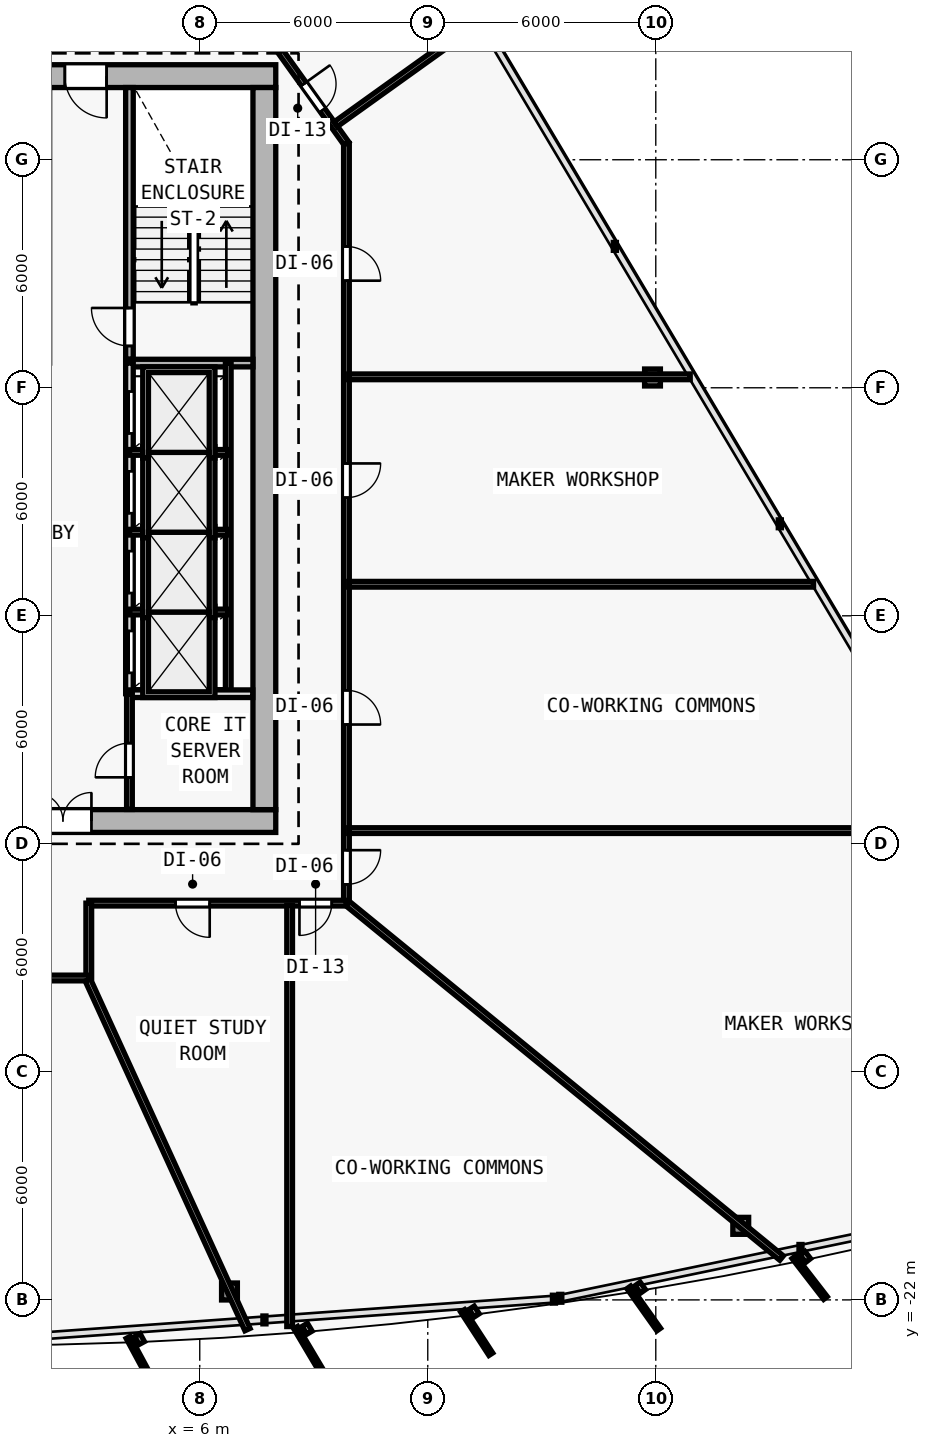
"""IFC4 building model, lengths in metres.
Left out: names, types, materials, properties, quantities, classifications, styles, units other than length and angle.
Written with IfcOpenShell. Run it as: python <this file> out.ifc"""

import sys

from ifc_helpers import new_model, si_unit, direction, frame, frame_2d, origin, origin_2d, place, context, subcontext, project, spatial, rectangle, i_section, extrude, element, fill, save


model = new_model("IFC4")
c1 = context("Model", 3, precision=1e-05, world=origin(), true_north=direction((0.0, 1.0)))
c2 = subcontext(c1, "Body", "Model", "MODEL_VIEW")
j1 = project(units=[si_unit("LENGTHUNIT", "METRE"), si_unit("PLANEANGLEUNIT", "RADIAN")], contexts=[c1])
p1 = place(None, origin())
s1 = spatial("IfcSite", under=j1, at=p1, CompositionType="ELEMENT")
p2 = place(p1, origin())
s2 = spatial("IfcBuilding", under=s1, at=p2, CompositionType="ELEMENT")
p3 = place(p2, frame((0.0, 0.0, 33.6)))
s3 = spatial("IfcBuildingStorey", under=s2, at=p3, CompositionType="ELEMENT", Elevation=33.6)
for number, where, z_axis, x_axis in (
    (1, (7.7, -9.4, 0.0), (0.0, 0.0, 1.0), (1.0, 0.0, 0.0)),
    (2, (7.7, 10.2, 0.0), (0.0, 0.0, 1.0), (1.0, 0.0, 0.0)),
    (3, (7.7, 0.4, 0.0), (0.0, 0.0, 1.0), (1.0, 0.0, 0.0)),
):
    element("IfcColumn", number, at=place(p3, frame(where, z_axis=z_axis, x_axis=x_axis)), inside=s3, PredefinedType="COLUMN", context=c2, shape_type="SweptSolid", body=[
        extrude(i_section(OverallWidth=0.416, OverallDepth=0.446, WebThickness=0.025, FlangeThickness=0.04, FilletRadius=0.015, at=origin_2d()), origin(), (0.0, 0.0, 1.0), 3.6),
    ])
p4 = place(p3, frame((6.782, -21.779, 0.005), z_axis=(-0.006865841702, 0.035280909339, 0.999353850072), x_axis=(-0.981585848295, -0.191021523464, 0.0)))
e4 = element("IfcColumn", 4, at=p4, inside=s3, PredefinedType="COLUMN", context=c2, shape_type="SweptSolid", body=[
    extrude(i_section(OverallWidth=0.416, OverallDepth=0.446, WebThickness=0.025, FlangeThickness=0.04, FilletRadius=0.015, at=origin_2d()), origin(), (0.0, 0.0, 1.0), 3.592),
])
p5 = place(p3, frame((20.236, -20.051, 0.005), z_axis=(-0.020594893987, 0.033509183946, 0.999226193078), x_axis=(-0.851954850327, -0.523615252838, 0.0)))
e5 = element("IfcColumn", 5, at=p5, inside=s3, PredefinedType="COLUMN", context=c2, shape_type="SweptSolid", body=[
    extrude(i_section(OverallWidth=0.416, OverallDepth=0.446, WebThickness=0.025, FlangeThickness=0.04, FilletRadius=0.015, at=origin_2d()), origin(), (0.0, 0.0, 1.0), 3.592),
])
p6 = place(p3, frame((17.914, 2.271, 0.005), z_axis=(-0.018906041, 0.009521027842, 0.999775930718), x_axis=(-0.449781931574, -0.893138406984, 0.0)))
e6 = element("IfcColumn", 6, at=p6, inside=s3, PredefinedType="COLUMN", context=c2, shape_type="SweptSolid", body=[
    extrude(i_section(OverallWidth=0.416, OverallDepth=0.446, WebThickness=0.025, FlangeThickness=0.04, FilletRadius=0.015, at=origin_2d()), origin(), (0.0, 0.0, 1.0), 3.59),
])
p7 = place(p3, frame((-8.0, -9.4, 0.0), z_axis=(0.0, 0.0, 1.0), x_axis=(1.0, 0.0, 0.0)))
e7 = element("IfcWall", 7, at=p7, inside=s3, PredefinedType="SHEAR", context=c2, shape_type="SweptSolid", body=[
    extrude(rectangle(XDim=16.0, YDim=0.6, at=frame_2d((8.0, 0.0))), origin(), (0.0, 0.0, 1.0), 3.35),
])
p8 = place(p7, frame((9.65, 0.0, 0.0)))
e8 = element("IfcOpeningElement", 8, at=p8, cuts=e7, PredefinedType="OPENING", context=c2, shape_type="SweptSolid", body=[
    extrude(rectangle(XDim=1.5, YDim=2.2, at=frame_2d((0.75, 1.1))), frame((0.0, 0.31, 0.0), z_axis=(0.0, -1.0, 0.0), x_axis=(1.0, 0.0, 0.0)), (0.0, 0.0, 1.0), 0.62),
])
p9 = place(p3, frame((8.0, 10.2, 0.0), z_axis=(0.0, 0.0, 1.0), x_axis=(-1.0, 0.0, 0.0)))
e9 = element("IfcWall", 9, at=p9, inside=s3, PredefinedType="SHEAR", context=c2, shape_type="SweptSolid", body=[
    extrude(rectangle(XDim=16.0, YDim=0.6, at=frame_2d((8.0, 0.0))), origin(), (0.0, 0.0, 1.0), 3.35),
])
p10 = place(p9, frame((4.45, 0.0, 0.0)))
e10 = element("IfcOpeningElement", 10, at=p10, cuts=e9, PredefinedType="OPENING", context=c2, shape_type="SweptSolid", body=[
    extrude(rectangle(XDim=1.1, YDim=2.15, at=frame_2d((0.55, 1.075))), frame((0.0, 0.31, 0.0), z_axis=(0.0, -1.0, 0.0), x_axis=(1.0, 0.0, 0.0)), (0.0, 0.0, 1.0), 0.62),
])
p11 = place(p3, frame((7.7, 9.9, 0.0), z_axis=(0.0, 0.0, 1.0), x_axis=(0.0, -1.0, 0.0)))
e11 = element("IfcWall", 11, at=p11, inside=s3, PredefinedType="SHEAR", context=c2, shape_type="SweptSolid", body=[
    extrude(rectangle(XDim=19.0, YDim=0.6, at=frame_2d((9.5, 0.0))), origin(), (0.0, 0.0, 1.0), 3.35),
])
p12 = place(p3, frame((4.15, 2.75, 0.0), z_axis=(0.0, 0.0, 1.0), x_axis=(0.0, 1.0, 0.0)))
e12 = element("IfcWall", 12, at=p12, inside=s3, PredefinedType="SOLIDWALL", context=c2, shape_type="SweptSolid", body=[
    extrude(rectangle(XDim=7.15, YDim=0.2, at=frame_2d((3.575, 0.0))), origin(), (0.0, 0.0, 1.0), 3.35),
])
p13 = place(p12, frame((0.35, 0.0, 0.0)))
e13 = element("IfcOpeningElement", 13, at=p13, cuts=e12, PredefinedType="OPENING", context=c2, shape_type="SweptSolid", body=[
    extrude(rectangle(XDim=1.0, YDim=2.15, at=frame_2d((0.5, 1.075))), frame((0.0, 0.11, 0.0), z_axis=(0.0, -1.0, 0.0), x_axis=(1.0, 0.0, 0.0)), (0.0, 0.0, 1.0), 0.22),
])
p14 = place(p3, frame((4.05, 2.65, 0.0), z_axis=(0.0, 0.0, 1.0), x_axis=(1.0, 0.0, 0.0)))
e14 = element("IfcWall", 14, at=p14, inside=s3, PredefinedType="SOLIDWALL", context=c2, shape_type="SweptSolid", body=[
    extrude(rectangle(XDim=3.35, YDim=0.2, at=frame_2d((1.675, 0.0))), origin(), (0.0, 0.0, 1.0), 3.35),
])
p15 = place(p3, frame((4.15, -6.05, 0.0), z_axis=(0.0, 0.0, 1.0), x_axis=(0.0, 1.0, 0.0)))
e15 = element("IfcWall", 15, at=p15, inside=s3, PredefinedType="SOLIDWALL", context=c2, shape_type="SweptSolid", body=[
    extrude(rectangle(XDim=8.7, YDim=0.2, at=frame_2d((4.35, 0.0))), origin(), (0.0, 0.0, 1.0), 3.35),
])
p16 = place(p15, frame((0.55, 0.0, 0.0)))
e16 = element("IfcOpeningElement", 16, at=p16, cuts=e15, PredefinedType="OPENING", context=c2, shape_type="SweptSolid", body=[
    extrude(rectangle(XDim=1.1, YDim=2.15, at=frame_2d((0.55, 1.075))), frame((0.0, 0.11, 0.0), z_axis=(0.0, -1.0, 0.0), x_axis=(1.0, 0.0, 0.0)), (0.0, 0.0, 1.0), 0.22),
])
p17 = place(p15, frame((2.65, 0.0, 0.0)))
e17 = element("IfcOpeningElement", 17, at=p17, cuts=e15, PredefinedType="OPENING", context=c2, shape_type="SweptSolid", body=[
    extrude(rectangle(XDim=1.1, YDim=2.15, at=frame_2d((0.55, 1.075))), frame((0.0, 0.11, 0.0), z_axis=(0.0, -1.0, 0.0), x_axis=(1.0, 0.0, 0.0)), (0.0, 0.0, 1.0), 0.22),
])
p18 = place(p15, frame((4.75, 0.0, 0.0)))
e18 = element("IfcOpeningElement", 18, at=p18, cuts=e15, PredefinedType="OPENING", context=c2, shape_type="SweptSolid", body=[
    extrude(rectangle(XDim=1.1, YDim=2.15, at=frame_2d((0.55, 1.075))), frame((0.0, 0.11, 0.0), z_axis=(0.0, -1.0, 0.0), x_axis=(1.0, 0.0, 0.0)), (0.0, 0.0, 1.0), 0.22),
])
p19 = place(p15, frame((6.85, 0.0, 0.0)))
e19 = element("IfcOpeningElement", 19, at=p19, cuts=e15, PredefinedType="OPENING", context=c2, shape_type="SweptSolid", body=[
    extrude(rectangle(XDim=1.1, YDim=2.15, at=frame_2d((0.55, 1.075))), frame((0.0, 0.11, 0.0), z_axis=(0.0, -1.0, 0.0), x_axis=(1.0, 0.0, 0.0)), (0.0, 0.0, 1.0), 0.22),
])
p20 = place(p3, frame((6.75, -6.05, 0.0), z_axis=(0.0, 0.0, 1.0), x_axis=(0.0, 1.0, 0.0)))
e20 = element("IfcWall", 20, at=p20, inside=s3, PredefinedType="PARTITIONING", context=c2, shape_type="SweptSolid", body=[
    extrude(rectangle(XDim=8.7, YDim=0.15, at=frame_2d((4.35, 0.0))), origin(), (0.0, 0.0, 1.0), 3.35),
])
for number, where, z_axis, x_axis in (
    (21, (4.15, -3.9, 0.0), (0.0, 0.0, 1.0), (1.0, 0.0, 0.0)),
    (22, (4.15, -1.8, 0.0), (0.0, 0.0, 1.0), (1.0, 0.0, 0.0)),
    (23, (4.15, 0.3, 0.0), (0.0, 0.0, 1.0), (1.0, 0.0, 0.0)),
):
    element("IfcWall", number, at=place(p3, frame(where, z_axis=z_axis, x_axis=x_axis)), inside=s3, PredefinedType="PARTITIONING", context=c2, shape_type="SweptSolid", body=[
        extrude(rectangle(XDim=2.6, YDim=0.15, at=frame_2d((1.3, 0.0))), origin(), (0.0, 0.0, 1.0), 3.35),
    ])
p21 = place(p3, frame((4.15, -6.05, 0.0), z_axis=(0.0, 0.0, 1.0), x_axis=(1.0, 0.0, 0.0)))
e24 = element("IfcWall", 24, at=p21, inside=s3, PredefinedType="SOLIDWALL", context=c2, shape_type="SweptSolid", body=[
    extrude(rectangle(XDim=3.245, YDim=0.2, at=frame_2d((1.623, 0.0))), origin(), (0.0, 0.0, 1.0), 3.35),
])
p22 = place(p3, frame((4.15, -9.095, 0.0), z_axis=(0.0, 0.0, 1.0), x_axis=(0.0, 1.0, 0.0)))
e25 = element("IfcWall", 25, at=p22, inside=s3, PredefinedType="PARTITIONING", context=c2, shape_type="SweptSolid", body=[
    extrude(rectangle(XDim=3.045, YDim=0.15, at=frame_2d((1.522, 0.0))), origin(), (0.0, 0.0, 1.0), 3.35),
])
p23 = place(p22, frame((0.845, 0.0, 0.0)))
e26 = element("IfcOpeningElement", 26, at=p23, cuts=e25, PredefinedType="OPENING", context=c2, shape_type="SweptSolid", body=[
    extrude(rectangle(XDim=0.9, YDim=2.1, at=frame_2d((0.45, 1.05))), frame((0.0, 0.085, 0.0), z_axis=(0.0, -1.0, 0.0), x_axis=(1.0, 0.0, 0.0)), (0.0, 0.0, 1.0), 0.17),
])
p24 = place(p3, frame((7.041, 12.36, 0.0), z_axis=(0.0, 0.0, 1.0), x_axis=(0.582449511476, -0.812866881218, 0.0)))
e27 = element("IfcWall", 27, at=p24, inside=s3, PredefinedType="PARTITIONING", context=c2, shape_type="SweptSolid", body=[
    extrude(rectangle(XDim=4.84, YDim=0.15, at=frame_2d((2.42, 0.0))), origin(), (0.0, 0.0, 1.0), 2.725),
])
p25 = place(p24, frame((2.911, 0.0, 0.0)))
e28 = element("IfcOpeningElement", 28, at=p25, cuts=e27, PredefinedType="OPENING", context=c2, shape_type="SweptSolid", body=[
    extrude(rectangle(XDim=0.85, YDim=2.1, at=frame_2d((0.425, 1.05))), frame((0.0, 0.085, 0.0), z_axis=(0.0, -1.0, 0.0), x_axis=(1.0, 0.0, 0.0)), (0.0, 0.0, 1.0), 0.17),
])
p26 = place(p3, frame((9.86, 8.426, 0.0), z_axis=(0.0, 0.0, 1.0), x_axis=(0.0, -1.0, 0.0)))
e29 = element("IfcWall", 29, at=p26, inside=s3, PredefinedType="PARTITIONING", context=c2, shape_type="SweptSolid", body=[
    extrude(rectangle(XDim=19.986, YDim=0.15, at=frame_2d((9.993, 0.0))), origin(), (0.0, 0.0, 1.0), 2.609),
])
p27 = place(p26, frame((18.592, 0.0, 0.0)))
e30 = element("IfcOpeningElement", 30, at=p27, cuts=e29, PredefinedType="OPENING", context=c2, shape_type="SweptSolid", body=[
    extrude(rectangle(XDim=0.9, YDim=2.1, at=frame_2d((0.45, 1.05))), frame((0.0, 0.085, 0.0), z_axis=(0.0, -1.0, 0.0), x_axis=(1.0, 0.0, 0.0)), (0.0, 0.0, 1.0), 0.17),
])
p28 = place(p26, frame((14.386, 0.0, 0.0)))
e31 = element("IfcOpeningElement", 31, at=p28, cuts=e29, PredefinedType="OPENING", context=c2, shape_type="SweptSolid", body=[
    extrude(rectangle(XDim=0.9, YDim=2.1, at=frame_2d((0.45, 1.05))), frame((0.0, 0.085, 0.0), z_axis=(0.0, -1.0, 0.0), x_axis=(1.0, 0.0, 0.0)), (0.0, 0.0, 1.0), 0.17),
])
p29 = place(p26, frame((8.417, 0.0, 0.0)))
e32 = element("IfcOpeningElement", 32, at=p29, cuts=e29, PredefinedType="OPENING", context=c2, shape_type="SweptSolid", body=[
    extrude(rectangle(XDim=0.9, YDim=2.1, at=frame_2d((0.45, 1.05))), frame((0.0, 0.085, 0.0), z_axis=(0.0, -1.0, 0.0), x_axis=(1.0, 0.0, 0.0)), (0.0, 0.0, 1.0), 0.17),
])
p30 = place(p26, frame((2.708, 0.0, 0.0)))
e33 = element("IfcOpeningElement", 33, at=p30, cuts=e29, PredefinedType="OPENING", context=c2, shape_type="SweptSolid", body=[
    extrude(rectangle(XDim=0.9, YDim=2.1, at=frame_2d((0.45, 1.05))), frame((0.0, 0.085, 0.0), z_axis=(0.0, -1.0, 0.0), x_axis=(1.0, 0.0, 0.0)), (0.0, 0.0, 1.0), 0.17),
])
p31 = place(p3, frame((9.86, -11.56, 0.0), z_axis=(0.0, 0.0, 1.0), x_axis=(-1.0, 0.0, 0.0)))
e34 = element("IfcWall", 34, at=p31, inside=s3, PredefinedType="PARTITIONING", context=c2, shape_type="SweptSolid", body=[
    extrude(rectangle(XDim=6.78, YDim=0.15, at=frame_2d((3.39, 0.0))), origin(), (0.0, 0.0, 1.0), 2.609),
])
p32 = place(p31, frame((3.598, 0.0, 0.0)))
e35 = element("IfcOpeningElement", 35, at=p32, cuts=e34, PredefinedType="OPENING", context=c2, shape_type="SweptSolid", body=[
    extrude(rectangle(XDim=0.9, YDim=2.1, at=frame_2d((0.45, 1.05))), frame((0.0, 0.085, 0.0), z_axis=(0.0, -1.0, 0.0), x_axis=(1.0, 0.0, 0.0)), (0.0, 0.0, 1.0), 0.17),
])
p33 = place(p31, frame((0.386, 0.0, 0.0)))
e36 = element("IfcOpeningElement", 36, at=p33, cuts=e34, PredefinedType="OPENING", context=c2, shape_type="SweptSolid", body=[
    extrude(rectangle(XDim=0.85, YDim=2.1, at=frame_2d((0.425, 1.05))), frame((0.0, 0.085, 0.0), z_axis=(0.0, -1.0, 0.0), x_axis=(1.0, 0.0, 0.0)), (0.0, 0.0, 1.0), 0.17),
])
p34 = place(p3, frame((3.08, -11.56, 0.0), z_axis=(0.0, 0.0, 1.0), x_axis=(0.0, -1.0, 0.0)))
e37 = element("IfcWall", 37, at=p34, inside=s3, PredefinedType="PARTITIONING", context=c2, shape_type="SweptSolid", body=[
    extrude(rectangle(XDim=1.97, YDim=0.15, at=frame_2d((0.985, 0.0))), origin(), (0.0, 0.0, 1.0), 2.925),
])
p35 = place(p3, frame((3.08, -13.53, 0.0), z_axis=(0.0, 0.0, 1.0), x_axis=(-1.0, 0.0, 0.0)))
e38 = element("IfcWall", 38, at=p35, inside=s3, PredefinedType="PARTITIONING", context=c2, shape_type="SweptSolid", body=[
    extrude(rectangle(XDim=6.16, YDim=0.15, at=frame_2d((3.08, 0.0))), origin(), (0.0, 0.0, 1.0), 2.725),
])
p36 = place(p3, frame((3.053, -13.579, 0.0), z_axis=(0.0, 0.0, 1.0), x_axis=(0.415476855596, -0.909603750247, 0.0)))
e39 = element("IfcWall", 39, at=p36, inside=s3, PredefinedType="PARTITIONING", context=c2, shape_type="SweptSolid", body=[
    extrude(rectangle(XDim=10.116, YDim=0.15, at=frame_2d((5.058, 0.0))), origin(), (0.0, 0.0, 1.0), 2.725),
])
p37 = place(p3, frame((9.888, -11.569, 0.0), z_axis=(0.0, 0.0, 1.0), x_axis=(0.774455620501, -0.632628241446, 0.0)))
e40 = element("IfcWall", 40, at=p37, inside=s3, PredefinedType="PARTITIONING", context=c2, shape_type="SweptSolid", body=[
    extrude(rectangle(XDim=14.749, YDim=0.15, at=frame_2d((7.375, 0.0))), origin(), (0.0, 0.0, 1.0), 2.609),
])
p38 = place(p3, frame((9.92, -9.652, 0.0), z_axis=(0.0, 0.0, 1.0), x_axis=(1.0, 0.0, 0.0)))
e41 = element("IfcWall", 41, at=p38, inside=s3, PredefinedType="PARTITIONING", context=c2, shape_type="SweptSolid", body=[
    extrude(rectangle(XDim=16.086, YDim=0.15, at=frame_2d((8.043, 0.0))), origin(), (0.0, 0.0, 1.0), 2.609),
])
p39 = place(p3, frame((9.92, 2.288, 0.0), z_axis=(0.0, 0.0, 1.0), x_axis=(1.0, 0.0, 0.0)))
e42 = element("IfcWall", 42, at=p39, inside=s3, PredefinedType="PARTITIONING", context=c2, shape_type="SweptSolid", body=[
    extrude(rectangle(XDim=8.986, YDim=0.15, at=frame_2d((4.493, 0.0))), origin(), (0.0, 0.0, 1.0), 2.735),
])
p40 = place(p3, frame((8.365, -11.62, 0.0), z_axis=(0.0, 0.0, 1.0), x_axis=(0.0, -1.0, 0.0)))
e43 = element("IfcWall", 43, at=p40, inside=s3, PredefinedType="PARTITIONING", context=c2, shape_type="SweptSolid", body=[
    extrude(rectangle(XDim=11.081, YDim=0.15, at=frame_2d((5.541, 0.0))), origin(), (0.0, 0.0, 1.0), 2.735),
])
p41 = place(p3, frame((9.92, -3.17, 0.0), z_axis=(0.0, 0.0, 1.0), x_axis=(1.0, 0.0, 0.0)))
e44 = element("IfcWall", 44, at=p41, inside=s3, PredefinedType="PARTITIONING", context=c2, shape_type="SweptSolid", body=[
    extrude(rectangle(XDim=12.231, YDim=0.15, at=frame_2d((6.116, 0.0))), origin(), (0.0, 0.0, 1.0), 2.735),
])
p42 = place(p3, frame((9.573, 8.93, 0.0), z_axis=(0.0, 0.0, 1.0), x_axis=(0.812855287807, 0.582465690907, 0.0)))
e45 = element("IfcWall", 45, at=p42, inside=s3, PredefinedType="PARTITIONING", context=c2, shape_type="SweptSolid", body=[
    extrude(rectangle(XDim=4.645, YDim=0.15, at=frame_2d((2.322, 0.0))), origin(), (0.0, 0.0, 1.0), 2.735),
])
p43 = place(p8, origin())
e46 = element("IfcDoor", 46, at=p43, inside=s3, OperationType="DOUBLE_DOOR_SINGLE_SWING", PredefinedType="DOOR", context=c2, shape_type="SweptSolid", body=[
    extrude(rectangle(XDim=1.5, YDim=2.2, at=frame_2d((0.75, 1.1))), frame((0.0, 0.025, 0.0), z_axis=(0.0, -1.0, 0.0), x_axis=(1.0, 0.0, 0.0)), (0.0, 0.0, 1.0), 0.05),
])
fill(e8, e46)
p44 = place(p10, origin())
e47 = element("IfcDoor", 47, at=p44, inside=s3, OperationType="SINGLE_SWING_LEFT", PredefinedType="DOOR", context=c2, shape_type="SweptSolid", body=[
    extrude(rectangle(XDim=1.1, YDim=2.15, at=frame_2d((0.55, 1.075))), frame((0.0, 0.025, 0.0), z_axis=(0.0, -1.0, 0.0), x_axis=(1.0, 0.0, 0.0)), (0.0, 0.0, 1.0), 0.05),
])
fill(e10, e47)
p45 = place(p13, origin())
e48 = element("IfcDoor", 48, at=p45, inside=s3, OperationType="SINGLE_SWING_RIGHT", PredefinedType="DOOR", context=c2, shape_type="SweptSolid", body=[
    extrude(rectangle(XDim=1.0, YDim=2.15, at=frame_2d((0.5, 1.075))), frame((0.0, 0.025, 0.0), z_axis=(0.0, -1.0, 0.0), x_axis=(1.0, 0.0, 0.0)), (0.0, 0.0, 1.0), 0.05),
])
fill(e13, e48)
p46 = place(p16, origin())
e49 = element("IfcDoor", 49, at=p46, inside=s3, OperationType="DOUBLE_DOOR_SLIDING", PredefinedType="DOOR", context=c2, shape_type="SweptSolid", body=[
    extrude(rectangle(XDim=1.1, YDim=2.15, at=frame_2d((0.55, 1.075))), frame((0.0, 0.025, 0.0), z_axis=(0.0, -1.0, 0.0), x_axis=(1.0, 0.0, 0.0)), (0.0, 0.0, 1.0), 0.05),
])
fill(e16, e49)
p47 = place(p17, origin())
e50 = element("IfcDoor", 50, at=p47, inside=s3, OperationType="DOUBLE_DOOR_SLIDING", PredefinedType="DOOR", context=c2, shape_type="SweptSolid", body=[
    extrude(rectangle(XDim=1.1, YDim=2.15, at=frame_2d((0.55, 1.075))), frame((0.0, 0.025, 0.0), z_axis=(0.0, -1.0, 0.0), x_axis=(1.0, 0.0, 0.0)), (0.0, 0.0, 1.0), 0.05),
])
fill(e17, e50)
p48 = place(p18, origin())
e51 = element("IfcDoor", 51, at=p48, inside=s3, OperationType="DOUBLE_DOOR_SLIDING", PredefinedType="DOOR", context=c2, shape_type="SweptSolid", body=[
    extrude(rectangle(XDim=1.1, YDim=2.15, at=frame_2d((0.55, 1.075))), frame((0.0, 0.025, 0.0), z_axis=(0.0, -1.0, 0.0), x_axis=(1.0, 0.0, 0.0)), (0.0, 0.0, 1.0), 0.05),
])
fill(e18, e51)
p49 = place(p19, origin())
e52 = element("IfcDoor", 52, at=p49, inside=s3, OperationType="DOUBLE_DOOR_SLIDING", PredefinedType="DOOR", context=c2, shape_type="SweptSolid", body=[
    extrude(rectangle(XDim=1.1, YDim=2.15, at=frame_2d((0.55, 1.075))), frame((0.0, 0.025, 0.0), z_axis=(0.0, -1.0, 0.0), x_axis=(1.0, 0.0, 0.0)), (0.0, 0.0, 1.0), 0.05),
])
fill(e19, e52)
p50 = place(p23, origin())
e53 = element("IfcDoor", 53, at=p50, inside=s3, OperationType="SINGLE_SWING_LEFT", PredefinedType="DOOR", context=c2, shape_type="SweptSolid", body=[
    extrude(rectangle(XDim=0.9, YDim=2.1, at=frame_2d((0.45, 1.05))), frame((0.0, 0.025, 0.0), z_axis=(0.0, -1.0, 0.0), x_axis=(1.0, 0.0, 0.0)), (0.0, 0.0, 1.0), 0.05),
])
fill(e26, e53)
p51 = place(p32, origin())
e54 = element("IfcDoor", 54, at=p51, inside=s3, OperationType="SINGLE_SWING_LEFT", PredefinedType="DOOR", context=c2, shape_type="SweptSolid", body=[
    extrude(rectangle(XDim=0.9, YDim=2.1, at=frame_2d((0.45, 1.05))), frame((0.0, 0.025, 0.0), z_axis=(0.0, -1.0, 0.0), x_axis=(1.0, 0.0, 0.0)), (0.0, 0.0, 1.0), 0.05),
])
fill(e35, e54)
p52 = place(p33, origin())
e55 = element("IfcDoor", 55, at=p52, inside=s3, OperationType="SINGLE_SWING_RIGHT", PredefinedType="DOOR", context=c2, shape_type="SweptSolid", body=[
    extrude(rectangle(XDim=0.85, YDim=2.1, at=frame_2d((0.425, 1.05))), frame((0.0, 0.025, 0.0), z_axis=(0.0, -1.0, 0.0), x_axis=(1.0, 0.0, 0.0)), (0.0, 0.0, 1.0), 0.05),
])
fill(e36, e55)
p53 = place(p27, origin())
e56 = element("IfcDoor", 56, at=p53, inside=s3, OperationType="SINGLE_SWING_LEFT", PredefinedType="DOOR", context=c2, shape_type="SweptSolid", body=[
    extrude(rectangle(XDim=0.9, YDim=2.1, at=frame_2d((0.45, 1.05))), frame((0.0, 0.025, 0.0), z_axis=(0.0, -1.0, 0.0), x_axis=(1.0, 0.0, 0.0)), (0.0, 0.0, 1.0), 0.05),
])
fill(e30, e56)
p54 = place(p28, origin())
e57 = element("IfcDoor", 57, at=p54, inside=s3, OperationType="SINGLE_SWING_RIGHT", PredefinedType="DOOR", context=c2, shape_type="SweptSolid", body=[
    extrude(rectangle(XDim=0.9, YDim=2.1, at=frame_2d((0.45, 1.05))), frame((0.0, 0.025, 0.0), z_axis=(0.0, -1.0, 0.0), x_axis=(1.0, 0.0, 0.0)), (0.0, 0.0, 1.0), 0.05),
])
fill(e31, e57)
p55 = place(p29, origin())
e58 = element("IfcDoor", 58, at=p55, inside=s3, OperationType="SINGLE_SWING_LEFT", PredefinedType="DOOR", context=c2, shape_type="SweptSolid", body=[
    extrude(rectangle(XDim=0.9, YDim=2.1, at=frame_2d((0.45, 1.05))), frame((0.0, 0.025, 0.0), z_axis=(0.0, -1.0, 0.0), x_axis=(1.0, 0.0, 0.0)), (0.0, 0.0, 1.0), 0.05),
])
fill(e32, e58)
p56 = place(p30, origin())
e59 = element("IfcDoor", 59, at=p56, inside=s3, OperationType="SINGLE_SWING_RIGHT", PredefinedType="DOOR", context=c2, shape_type="SweptSolid", body=[
    extrude(rectangle(XDim=0.9, YDim=2.1, at=frame_2d((0.45, 1.05))), frame((0.0, 0.025, 0.0), z_axis=(0.0, -1.0, 0.0), x_axis=(1.0, 0.0, 0.0)), (0.0, 0.0, 1.0), 0.05),
])
fill(e33, e59)
p57 = place(p25, origin())
e60 = element("IfcDoor", 60, at=p57, inside=s3, OperationType="SINGLE_SWING_LEFT", PredefinedType="DOOR", context=c2, shape_type="SweptSolid", body=[
    extrude(rectangle(XDim=0.85, YDim=2.1, at=frame_2d((0.425, 1.05))), frame((0.0, 0.025, 0.0), z_axis=(0.0, -1.0, 0.0), x_axis=(1.0, 0.0, 0.0)), (0.0, 0.0, 1.0), 0.05),
])
fill(e28, e60)
save(model, sys.argv[1])
